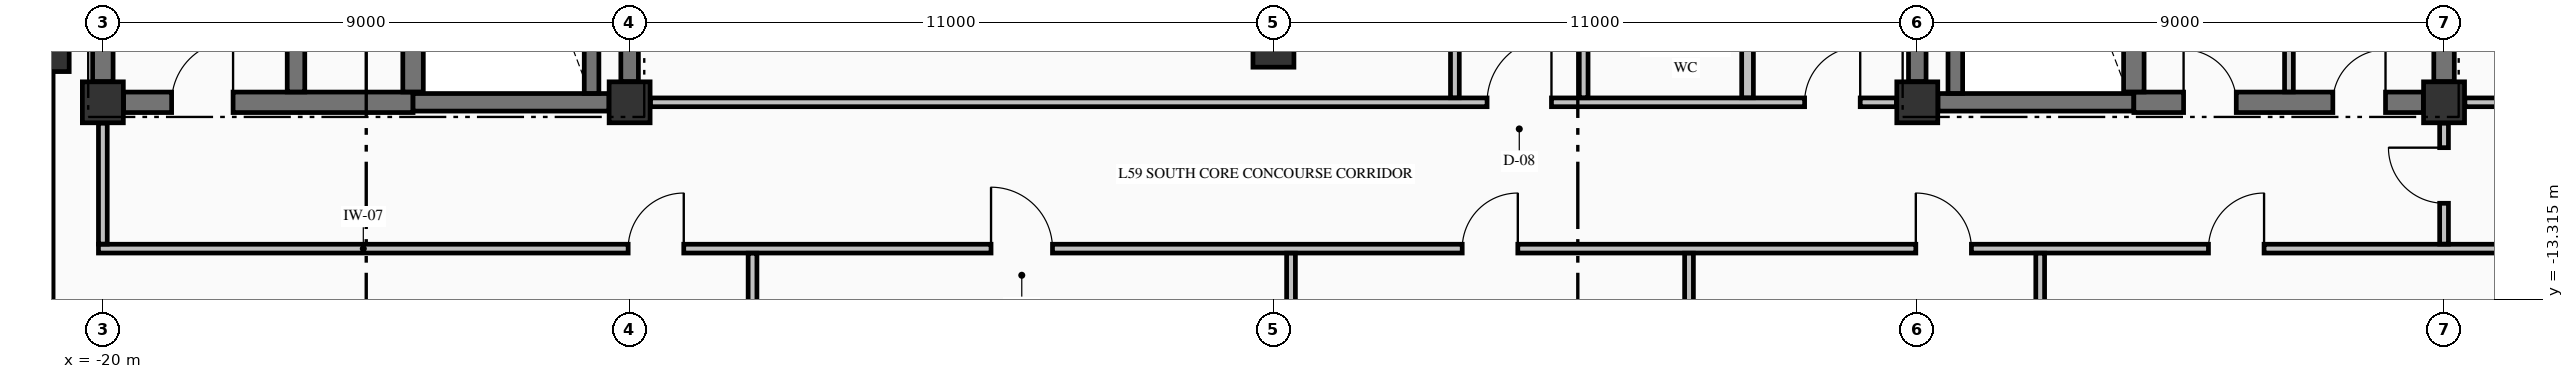
"""IFC4 building model, lengths in metres.
Left out: names, types, materials, properties, quantities, classifications, styles, units other than length and angle.
Written with IfcOpenShell. Run it as: python <this file> out.ifc"""

import sys

from ifc_helpers import new_model, si_unit, direction, frame, frame_2d, origin, origin_2d, place, context, subcontext, project, spatial, rectangle, extrude, element, fill, save


model = new_model("IFC4")
c1 = context("Model", 3, precision=1e-05, world=origin(), true_north=direction((0.0, 1.0)))
c2 = subcontext(c1, "Body", "Model", "MODEL_VIEW")
j1 = project(units=[si_unit("LENGTHUNIT", "METRE"), si_unit("PLANEANGLEUNIT", "RADIAN")], contexts=[c1])
p1 = place(None, origin())
s1 = spatial("IfcSite", under=j1, at=p1, CompositionType="ELEMENT")
p2 = place(p1, origin())
s2 = spatial("IfcBuilding", under=s1, at=p2, CompositionType="ELEMENT")
p3 = place(p2, frame((0.0, 0.0, 226.82)))
s3 = spatial("IfcBuildingStorey", under=s2, at=p3, CompositionType="ELEMENT", Elevation=226.82)
p4 = place(p3, frame((-21.0, -9.0, -0.425), z_axis=(0.0, 0.0, 1.0), x_axis=(1.0, 0.0, 0.0)))
e1 = element("IfcColumn", 1, at=p4, inside=s3, PredefinedType="COLUMN", context=c2, shape_type="SweptSolid", body=[
    extrude(rectangle(XDim=0.85, YDim=0.85, at=origin_2d()), origin(), (0.0, 0.0, 1.0), 3.405),
])
for number, where, z_axis, x_axis in (
    (2, (-20.0, -9.95, -0.425), (0.0, 0.0, 1.0), (1.0, 0.0, 0.0)),
    (3, (-11.0, -9.95, -0.425), (0.0, 0.0, 1.0), (1.0, 0.0, 0.0)),
    (4, (11.0, -9.95, -0.425), (0.0, 0.0, 1.0), (1.0, 0.0, 0.0)),
    (5, (20.0, -9.95, -0.425), (0.0, 0.0, 1.0), (1.0, 0.0, 0.0)),
    (6, (0.0, -9.0, -0.425), (0.0, 0.0, 1.0), (1.0, 0.0, 0.0)),
):
    element("IfcColumn", number, at=place(p3, frame(where, z_axis=z_axis, x_axis=x_axis)), inside=s3, PredefinedType="COLUMN", context=c2, shape_type="SweptSolid", body=[
        extrude(rectangle(XDim=0.7, YDim=0.7, at=origin_2d()), origin(), (0.0, 0.0, 1.0), 3.405),
    ])
p5 = place(p3, frame((-21.0, -9.455, 0.0), z_axis=(0.0, 0.0, 1.0), x_axis=(0.0, -1.0, 0.0)))
e7 = element("IfcWall", 7, at=p5, inside=s3, PredefinedType="STANDARD", context=c2, shape_type="SweptSolid", body=[
    extrude(rectangle(XDim=8.09, YDim=0.3, at=frame_2d((4.045, 0.0))), origin(), (0.0, 0.0, 1.0), 2.372),
])
p6 = place(p3, frame((-19.646, -9.95, 0.0), z_axis=(0.0, 0.0, 1.0), x_axis=(1.0, 0.0, 0.0)))
e8 = element("IfcWall", 8, at=p6, inside=s3, PredefinedType="SHEAR", context=c2, shape_type="SweptSolid", body=[
    extrude(rectangle(XDim=4.946, YDim=0.35, at=frame_2d((2.473, 0.0))), origin(), (0.0, 0.0, 1.0), 2.98),
])
p7 = place(p6, frame((0.821, 0.0, 0.0)))
e9 = element("IfcOpeningElement", 9, at=p7, cuts=e8, PredefinedType="OPENING", context=c2, shape_type="SweptSolid", body=[
    extrude(rectangle(XDim=1.05, YDim=2.15, at=frame_2d((0.525, 1.075))), frame((0.0, 0.185, 0.0), z_axis=(0.0, -1.0, 0.0), x_axis=(1.0, 0.0, 0.0)), (0.0, 0.0, 1.0), 0.37),
])
for number, where, z_axis, x_axis in (
    (10, (-14.7, -9.95, 0.0), (0.0, 0.0, 1.0), (1.0, 0.0, 0.0)),
    (11, (11.354, -9.95, 0.0), (0.0, 0.0, 1.0), (1.0, 0.0, 0.0)),
):
    element("IfcWall", number, at=place(p3, frame(where, z_axis=z_axis, x_axis=x_axis)), inside=s3, PredefinedType="SHEAR", context=c2, shape_type="SweptSolid", body=[
        extrude(rectangle(XDim=3.346, YDim=0.3, at=frame_2d((1.673, 0.0))), origin(), (0.0, 0.0, 1.0), 2.98),
    ])
p8 = place(p3, frame((14.7, -9.95, 0.0), z_axis=(0.0, 0.0, 1.0), x_axis=(1.0, 0.0, 0.0)))
e12 = element("IfcWall", 12, at=p8, inside=s3, PredefinedType="SHEAR", context=c2, shape_type="SweptSolid", body=[
    extrude(rectangle(XDim=4.946, YDim=0.35, at=frame_2d((2.473, 0.0))), origin(), (0.0, 0.0, 1.0), 2.98),
])
p9 = place(p8, frame((0.85, 0.0, 0.0)))
e13 = element("IfcOpeningElement", 13, at=p9, cuts=e12, PredefinedType="OPENING", context=c2, shape_type="SweptSolid", body=[
    extrude(rectangle(XDim=0.9, YDim=2.15, at=frame_2d((0.45, 1.075))), frame((0.0, 0.185, 0.0), z_axis=(0.0, -1.0, 0.0), x_axis=(1.0, 0.0, 0.0)), (0.0, 0.0, 1.0), 0.37),
])
p10 = place(p8, frame((3.4, 0.0, 0.0)))
e14 = element("IfcOpeningElement", 14, at=p10, cuts=e12, PredefinedType="OPENING", context=c2, shape_type="SweptSolid", body=[
    extrude(rectangle(XDim=0.9, YDim=2.15, at=frame_2d((0.45, 1.075))), frame((0.0, 0.185, 0.0), z_axis=(0.0, -1.0, 0.0), x_axis=(1.0, 0.0, 0.0)), (0.0, 0.0, 1.0), 0.37),
])
p11 = place(p3, frame((-20.075, -12.45, 0.0), z_axis=(0.0, 0.0, 1.0), x_axis=(1.0, 0.0, 0.0)))
e15 = element("IfcWall", 15, at=p11, inside=s3, PredefinedType="PARTITIONING", context=c2, shape_type="SweptSolid", body=[
    extrude(rectangle(XDim=45.91, YDim=0.15, at=frame_2d((22.955, 0.0))), origin(), (0.0, 0.0, 1.0), 2.98),
])
p12 = place(p11, frame((9.05, 0.0, 0.0)))
e16 = element("IfcOpeningElement", 16, at=p12, cuts=e15, PredefinedType="OPENING", context=c2, shape_type="SweptSolid", body=[
    extrude(rectangle(XDim=0.95, YDim=2.15, at=frame_2d((0.475, 1.075))), frame((0.0, 0.085, 0.0), z_axis=(0.0, -1.0, 0.0), x_axis=(1.0, 0.0, 0.0)), (0.0, 0.0, 1.0), 0.17),
])
p13 = place(p11, frame((15.25, 0.0, 0.0)))
e17 = element("IfcOpeningElement", 17, at=p13, cuts=e15, PredefinedType="OPENING", context=c2, shape_type="SweptSolid", body=[
    extrude(rectangle(XDim=1.05, YDim=2.15, at=frame_2d((0.525, 1.075))), frame((0.0, 0.085, 0.0), z_axis=(0.0, -1.0, 0.0), x_axis=(1.0, 0.0, 0.0)), (0.0, 0.0, 1.0), 0.17),
])
p14 = place(p11, frame((23.3, 0.0, 0.0)))
e18 = element("IfcOpeningElement", 18, at=p14, cuts=e15, PredefinedType="OPENING", context=c2, shape_type="SweptSolid", body=[
    extrude(rectangle(XDim=0.95, YDim=2.15, at=frame_2d((0.475, 1.075))), frame((0.0, 0.085, 0.0), z_axis=(0.0, -1.0, 0.0), x_axis=(1.0, 0.0, 0.0)), (0.0, 0.0, 1.0), 0.17),
])
p15 = place(p11, frame((31.05, 0.0, 0.0)))
e19 = element("IfcOpeningElement", 19, at=p15, cuts=e15, PredefinedType="OPENING", context=c2, shape_type="SweptSolid", body=[
    extrude(rectangle(XDim=0.95, YDim=2.15, at=frame_2d((0.475, 1.075))), frame((0.0, 0.085, 0.0), z_axis=(0.0, -1.0, 0.0), x_axis=(1.0, 0.0, 0.0)), (0.0, 0.0, 1.0), 0.17),
])
p16 = place(p11, frame((36.05, 0.0, 0.0)))
e20 = element("IfcOpeningElement", 20, at=p16, cuts=e15, PredefinedType="OPENING", context=c2, shape_type="SweptSolid", body=[
    extrude(rectangle(XDim=0.95, YDim=2.15, at=frame_2d((0.475, 1.075))), frame((0.0, 0.085, 0.0), z_axis=(0.0, -1.0, 0.0), x_axis=(1.0, 0.0, 0.0)), (0.0, 0.0, 1.0), 0.17),
])
p17 = place(p3, frame((-10.644, -9.95, 0.0), z_axis=(0.0, 0.0, 1.0), x_axis=(1.0, 0.0, 0.0)))
e21 = element("IfcWall", 21, at=p17, inside=s3, PredefinedType="PARTITIONING", context=c2, shape_type="SweptSolid", body=[
    extrude(rectangle(XDim=21.288, YDim=0.15, at=frame_2d((10.644, 0.0))), origin(), (0.0, 0.0, 1.0), 2.98),
])
p18 = place(p17, frame((14.294, 0.0, 0.0)))
e22 = element("IfcOpeningElement", 22, at=p18, cuts=e21, PredefinedType="OPENING", context=c2, shape_type="SweptSolid", body=[
    extrude(rectangle(XDim=1.1, YDim=2.15, at=frame_2d((0.55, 1.075))), frame((0.0, 0.085, 0.0), z_axis=(0.0, -1.0, 0.0), x_axis=(1.0, 0.0, 0.0)), (0.0, 0.0, 1.0), 0.17),
])
p19 = place(p17, frame((19.719, 0.0, 0.0)))
e23 = element("IfcOpeningElement", 23, at=p19, cuts=e21, PredefinedType="OPENING", context=c2, shape_type="SweptSolid", body=[
    extrude(rectangle(XDim=0.95, YDim=2.15, at=frame_2d((0.475, 1.075))), frame((0.0, 0.085, 0.0), z_axis=(0.0, -1.0, 0.0), x_axis=(1.0, 0.0, 0.0)), (0.0, 0.0, 1.0), 0.17),
])
p20 = place(p3, frame((20.356, -9.95, 0.0), z_axis=(0.0, 0.0, 1.0), x_axis=(1.0, 0.0, 0.0)))
e24 = element("IfcWall", 24, at=p20, inside=s3, PredefinedType="PARTITIONING", context=c2, shape_type="SweptSolid", body=[
    extrude(rectangle(XDim=5.479, YDim=0.15, at=frame_2d((2.74, 0.0))), origin(), (0.0, 0.0, 1.0), 2.98),
])
p21 = place(p20, frame((2.169, 0.0, 0.0)))
e25 = element("IfcOpeningElement", 25, at=p21, cuts=e24, PredefinedType="OPENING", context=c2, shape_type="SweptSolid", body=[
    extrude(rectangle(XDim=0.95, YDim=2.15, at=frame_2d((0.475, 1.075))), frame((0.0, 0.085, 0.0), z_axis=(0.0, -1.0, 0.0), x_axis=(1.0, 0.0, 0.0)), (0.0, 0.0, 1.0), 0.17),
])
p22 = place(p3, frame((-20.0, -9.596, 0.0), z_axis=(0.0, 0.0, 1.0), x_axis=(0.0, 1.0, 0.0)))
e26 = element("IfcWall", 26, at=p22, inside=s3, PredefinedType="SHEAR", context=c2, shape_type="SweptSolid", body=[
    extrude(rectangle(XDim=9.194, YDim=0.35, at=frame_2d((4.597, 0.0))), origin(), (0.0, 0.0, 1.0), 2.98),
])
p23 = place(p3, frame((-16.7, -9.773, 0.0), z_axis=(0.0, 0.0, 1.0), x_axis=(0.0, 1.0, 0.0)))
e27 = element("IfcWall", 27, at=p23, inside=s3, PredefinedType="SHEAR", context=c2, shape_type="SweptSolid", body=[
    extrude(rectangle(XDim=9.371, YDim=0.3, at=frame_2d((4.686, 0.0))), origin(), (0.0, 0.0, 1.0), 2.98),
])
p24 = place(p3, frame((-14.7, -9.773, 0.0), z_axis=(0.0, 0.0, 1.0), x_axis=(0.0, 1.0, 0.0)))
e28 = element("IfcWall", 28, at=p24, inside=s3, PredefinedType="SHEAR", context=c2, shape_type="SweptSolid", body=[
    extrude(rectangle(XDim=9.371, YDim=0.35, at=frame_2d((4.686, 0.0))), origin(), (0.0, 0.0, 1.0), 2.98),
])
p25 = place(p3, frame((-11.65, -9.798, 0.0), z_axis=(0.0, 0.0, 1.0), x_axis=(0.0, 1.0, 0.0)))
e29 = element("IfcWall", 29, at=p25, inside=s3, PredefinedType="SOLIDWALL", context=c2, shape_type="SweptSolid", body=[
    extrude(rectangle(XDim=9.396, YDim=0.25, at=frame_2d((4.698, 0.0))), origin(), (0.0, 0.0, 1.0), 2.98),
])
for number, where, z_axis, x_axis in (
    (30, (-11.0, -9.596, 0.0), (0.0, 0.0, 1.0), (0.0, 1.0, 0.0)),
    (31, (11.0, -9.596, 0.0), (0.0, 0.0, 1.0), (0.0, 1.0, 0.0)),
):
    element("IfcWall", number, at=place(p3, frame(where, z_axis=z_axis, x_axis=x_axis)), inside=s3, PredefinedType="SHEAR", context=c2, shape_type="SweptSolid", body=[
        extrude(rectangle(XDim=9.242, YDim=0.3, at=frame_2d((4.621, 0.0))), origin(), (0.0, 0.0, 1.0), 2.98),
    ])
p26 = place(p3, frame((11.65, -9.798, 0.0), z_axis=(0.0, 0.0, 1.0), x_axis=(0.0, 1.0, 0.0)))
e32 = element("IfcWall", 32, at=p26, inside=s3, PredefinedType="SOLIDWALL", context=c2, shape_type="SweptSolid", body=[
    extrude(rectangle(XDim=9.396, YDim=0.25, at=frame_2d((4.698, 0.0))), origin(), (0.0, 0.0, 1.0), 2.98),
])
p27 = place(p3, frame((14.7, -9.773, 0.0), z_axis=(0.0, 0.0, 1.0), x_axis=(0.0, 1.0, 0.0)))
e33 = element("IfcWall", 33, at=p27, inside=s3, PredefinedType="SHEAR", context=c2, shape_type="SweptSolid", body=[
    extrude(rectangle(XDim=9.371, YDim=0.35, at=frame_2d((4.686, 0.0))), origin(), (0.0, 0.0, 1.0), 2.98),
])
p28 = place(p3, frame((20.0, -9.596, 0.0), z_axis=(0.0, 0.0, 1.0), x_axis=(0.0, 1.0, 0.0)))
e34 = element("IfcWall", 34, at=p28, inside=s3, PredefinedType="SHEAR", context=c2, shape_type="SweptSolid", body=[
    extrude(rectangle(XDim=9.242, YDim=0.35, at=frame_2d((4.621, 0.0))), origin(), (0.0, 0.0, 1.0), 2.98),
])
p29 = place(p3, frame((-20.0, -12.372, 0.0), z_axis=(0.0, 0.0, 1.0), x_axis=(0.0, 1.0, 0.0)))
e35 = element("IfcWall", 35, at=p29, inside=s3, PredefinedType="PARTITIONING", context=c2, shape_type="SweptSolid", body=[
    extrude(rectangle(XDim=2.066, YDim=0.15, at=frame_2d((1.033, 0.0))), origin(), (0.0, 0.0, 1.0), 2.57),
])
p30 = place(p3, frame((-8.9, -23.335, 0.0), z_axis=(0.0, 0.0, 1.0), x_axis=(0.0, 1.0, 0.0)))
e36 = element("IfcWall", 36, at=p30, inside=s3, PredefinedType="PARTITIONING", context=c2, shape_type="SweptSolid", body=[
    extrude(rectangle(XDim=10.807, YDim=0.15, at=frame_2d((5.403, 0.0))), origin(), (0.0, 0.0, 1.0), 2.98),
])
p31 = place(p3, frame((0.3, -23.069, 0.0), z_axis=(0.0, 0.0, 1.0), x_axis=(0.0, 1.0, 0.0)))
e37 = element("IfcWall", 37, at=p31, inside=s3, PredefinedType="PARTITIONING", context=c2, shape_type="SweptSolid", body=[
    extrude(rectangle(XDim=10.541, YDim=0.15, at=frame_2d((5.271, 0.0))), origin(), (0.0, 0.0, 1.0), 2.395),
])
p32 = place(p3, frame((3.1, -9.872, 0.0), z_axis=(0.0, 0.0, 1.0), x_axis=(0.0, 1.0, 0.0)))
e38 = element("IfcWall", 38, at=p32, inside=s3, PredefinedType="PARTITIONING", context=c2, shape_type="SweptSolid", body=[
    extrude(rectangle(XDim=9.544, YDim=0.15, at=frame_2d((4.772, 0.0))), origin(), (0.0, 0.0, 1.0), 2.98),
])
p33 = place(p3, frame((5.3, -9.872, 0.0), z_axis=(0.0, 0.0, 1.0), x_axis=(0.0, 1.0, 0.0)))
e39 = element("IfcWall", 39, at=p33, inside=s3, PredefinedType="PARTITIONING", context=c2, shape_type="SweptSolid", body=[
    extrude(rectangle(XDim=4.919, YDim=0.15, at=frame_2d((2.459, 0.0))), origin(), (0.0, 0.0, 1.0), 2.98),
])
p34 = place(p33, frame((1.997, 0.0, 0.0)))
e40 = element("IfcOpeningElement", 40, at=p34, cuts=e39, PredefinedType="OPENING", context=c2, shape_type="SweptSolid", body=[
    extrude(rectangle(XDim=0.95, YDim=2.15, at=frame_2d((0.475, 1.075))), frame((0.0, 0.085, 0.0), z_axis=(0.0, -1.0, 0.0), x_axis=(1.0, 0.0, 0.0)), (0.0, 0.0, 1.0), 0.17),
])
p35 = place(p3, frame((7.1, -23.335, 0.0), z_axis=(0.0, 0.0, 1.0), x_axis=(0.0, 1.0, 0.0)))
e41 = element("IfcWall", 41, at=p35, inside=s3, PredefinedType="PARTITIONING", context=c2, shape_type="SweptSolid", body=[
    extrude(rectangle(XDim=10.807, YDim=0.15, at=frame_2d((5.403, 0.0))), origin(), (0.0, 0.0, 1.0), 2.98),
])
p36 = place(p3, frame((8.1, -9.872, 0.0), z_axis=(0.0, 0.0, 1.0), x_axis=(0.0, 1.0, 0.0)))
e42 = element("IfcWall", 42, at=p36, inside=s3, PredefinedType="PARTITIONING", context=c2, shape_type="SweptSolid", body=[
    extrude(rectangle(XDim=4.919, YDim=0.2, at=frame_2d((2.459, 0.0))), origin(), (0.0, 0.0, 1.0), 2.98),
])
p37 = place(p3, frame((13.1, -23.335, 0.0), z_axis=(0.0, 0.0, 1.0), x_axis=(0.0, 1.0, 0.0)))
e43 = element("IfcWall", 43, at=p37, inside=s3, PredefinedType="PARTITIONING", context=c2, shape_type="SweptSolid", body=[
    extrude(rectangle(XDim=10.807, YDim=0.15, at=frame_2d((5.403, 0.0))), origin(), (0.0, 0.0, 1.0), 2.98),
])
p38 = place(p3, frame((17.35, -9.772, 0.0), z_axis=(0.0, 0.0, 1.0), x_axis=(0.0, 1.0, 0.0)))
e44 = element("IfcWall", 44, at=p38, inside=s3, PredefinedType="PARTITIONING", context=c2, shape_type="SweptSolid", body=[
    extrude(rectangle(XDim=14.494, YDim=0.15, at=frame_2d((7.247, 0.0))), origin(), (0.0, 0.0, 1.0), 2.98),
])
p39 = place(p3, frame((20.0, -12.372, 0.0), z_axis=(0.0, 0.0, 1.0), x_axis=(0.0, 1.0, 0.0)))
e45 = element("IfcWall", 45, at=p39, inside=s3, PredefinedType="PARTITIONING", context=c2, shape_type="SweptSolid", body=[
    extrude(rectangle(XDim=2.066, YDim=0.15, at=frame_2d((1.033, 0.0))), origin(), (0.0, 0.0, 1.0), 2.98),
])
p40 = place(p39, frame((0.697, 0.0, 0.0)))
e46 = element("IfcOpeningElement", 46, at=p40, cuts=e45, PredefinedType="OPENING", context=c2, shape_type="SweptSolid", body=[
    extrude(rectangle(XDim=0.95, YDim=2.15, at=frame_2d((0.475, 1.075))), frame((0.0, 0.085, 0.0), z_axis=(0.0, -1.0, 0.0), x_axis=(1.0, 0.0, 0.0)), (0.0, 0.0, 1.0), 0.17),
])
p41 = place(p7, origin())
e47 = element("IfcDoor", 47, at=p41, inside=s3, OperationType="SINGLE_SWING_RIGHT", PredefinedType="DOOR", context=c2, shape_type="SweptSolid", body=[
    extrude(rectangle(XDim=1.05, YDim=2.15, at=frame_2d((0.525, 1.075))), frame((0.0, 0.025, 0.0), z_axis=(0.0, -1.0, 0.0), x_axis=(1.0, 0.0, 0.0)), (0.0, 0.0, 1.0), 0.05),
])
fill(e9, e47)
p42 = place(p9, origin())
e48 = element("IfcDoor", 48, at=p42, inside=s3, OperationType="SINGLE_SWING_LEFT", PredefinedType="DOOR", context=c2, shape_type="SweptSolid", body=[
    extrude(rectangle(XDim=0.9, YDim=2.15, at=frame_2d((0.45, 1.075))), frame((0.0, 0.025, 0.0), z_axis=(0.0, -1.0, 0.0), x_axis=(1.0, 0.0, 0.0)), (0.0, 0.0, 1.0), 0.05),
])
fill(e13, e48)
p43 = place(p10, origin())
e49 = element("IfcDoor", 49, at=p43, inside=s3, OperationType="SINGLE_SWING_RIGHT", PredefinedType="DOOR", context=c2, shape_type="SweptSolid", body=[
    extrude(rectangle(XDim=0.9, YDim=2.15, at=frame_2d((0.45, 1.075))), frame((0.0, 0.025, 0.0), z_axis=(0.0, -1.0, 0.0), x_axis=(1.0, 0.0, 0.0)), (0.0, 0.0, 1.0), 0.05),
])
fill(e14, e49)
p44 = place(p18, origin())
e50 = element("IfcDoor", 50, at=p44, inside=s3, OperationType="SINGLE_SWING_RIGHT", PredefinedType="DOOR", context=c2, shape_type="SweptSolid", body=[
    extrude(rectangle(XDim=1.1, YDim=2.15, at=frame_2d((0.55, 1.075))), frame((0.0, 0.025, 0.0), z_axis=(0.0, -1.0, 0.0), x_axis=(1.0, 0.0, 0.0)), (0.0, 0.0, 1.0), 0.05),
])
fill(e22, e50)
p45 = place(p12, origin())
e51 = element("IfcDoor", 51, at=p45, inside=s3, OperationType="SINGLE_SWING_RIGHT", PredefinedType="DOOR", context=c2, shape_type="SweptSolid", body=[
    extrude(rectangle(XDim=0.95, YDim=2.15, at=frame_2d((0.475, 1.075))), frame((0.0, 0.025, 0.0), z_axis=(0.0, -1.0, 0.0), x_axis=(1.0, 0.0, 0.0)), (0.0, 0.0, 1.0), 0.05),
])
fill(e16, e51)
p46 = place(p13, origin())
e52 = element("IfcDoor", 52, at=p46, inside=s3, OperationType="SINGLE_SWING_LEFT", PredefinedType="DOOR", context=c2, shape_type="SweptSolid", body=[
    extrude(rectangle(XDim=1.05, YDim=2.15, at=frame_2d((0.525, 1.075))), frame((0.0, 0.025, 0.0), z_axis=(0.0, -1.0, 0.0), x_axis=(1.0, 0.0, 0.0)), (0.0, 0.0, 1.0), 0.05),
])
fill(e17, e52)
p47 = place(p14, origin())
e53 = element("IfcDoor", 53, at=p47, inside=s3, OperationType="SINGLE_SWING_RIGHT", PredefinedType="DOOR", context=c2, shape_type="SweptSolid", body=[
    extrude(rectangle(XDim=0.95, YDim=2.15, at=frame_2d((0.475, 1.075))), frame((0.0, 0.025, 0.0), z_axis=(0.0, -1.0, 0.0), x_axis=(1.0, 0.0, 0.0)), (0.0, 0.0, 1.0), 0.05),
])
fill(e18, e53)
p48 = place(p15, origin())
e54 = element("IfcDoor", 54, at=p48, inside=s3, OperationType="SINGLE_SWING_LEFT", PredefinedType="DOOR", context=c2, shape_type="SweptSolid", body=[
    extrude(rectangle(XDim=0.95, YDim=2.15, at=frame_2d((0.475, 1.075))), frame((0.0, 0.025, 0.0), z_axis=(0.0, -1.0, 0.0), x_axis=(1.0, 0.0, 0.0)), (0.0, 0.0, 1.0), 0.05),
])
fill(e19, e54)
p49 = place(p16, origin())
e55 = element("IfcDoor", 55, at=p49, inside=s3, OperationType="SINGLE_SWING_RIGHT", PredefinedType="DOOR", context=c2, shape_type="SweptSolid", body=[
    extrude(rectangle(XDim=0.95, YDim=2.15, at=frame_2d((0.475, 1.075))), frame((0.0, 0.025, 0.0), z_axis=(0.0, -1.0, 0.0), x_axis=(1.0, 0.0, 0.0)), (0.0, 0.0, 1.0), 0.05),
])
fill(e20, e55)
p50 = place(p19, origin())
e56 = element("IfcDoor", 56, at=p50, inside=s3, OperationType="SINGLE_SWING_RIGHT", PredefinedType="DOOR", context=c2, shape_type="SweptSolid", body=[
    extrude(rectangle(XDim=0.95, YDim=2.15, at=frame_2d((0.475, 1.075))), frame((0.0, 0.025, 0.0), z_axis=(0.0, -1.0, 0.0), x_axis=(1.0, 0.0, 0.0)), (0.0, 0.0, 1.0), 0.05),
])
fill(e23, e56)
p51 = place(p40, origin())
e57 = element("IfcDoor", 57, at=p51, inside=s3, OperationType="SINGLE_SWING_RIGHT", PredefinedType="DOOR", context=c2, shape_type="SweptSolid", body=[
    extrude(rectangle(XDim=0.95, YDim=2.15, at=frame_2d((0.475, 1.075))), frame((0.0, 0.025, 0.0), z_axis=(0.0, -1.0, 0.0), x_axis=(1.0, 0.0, 0.0)), (0.0, 0.0, 1.0), 0.05),
])
fill(e46, e57)
save(model, sys.argv[1])
